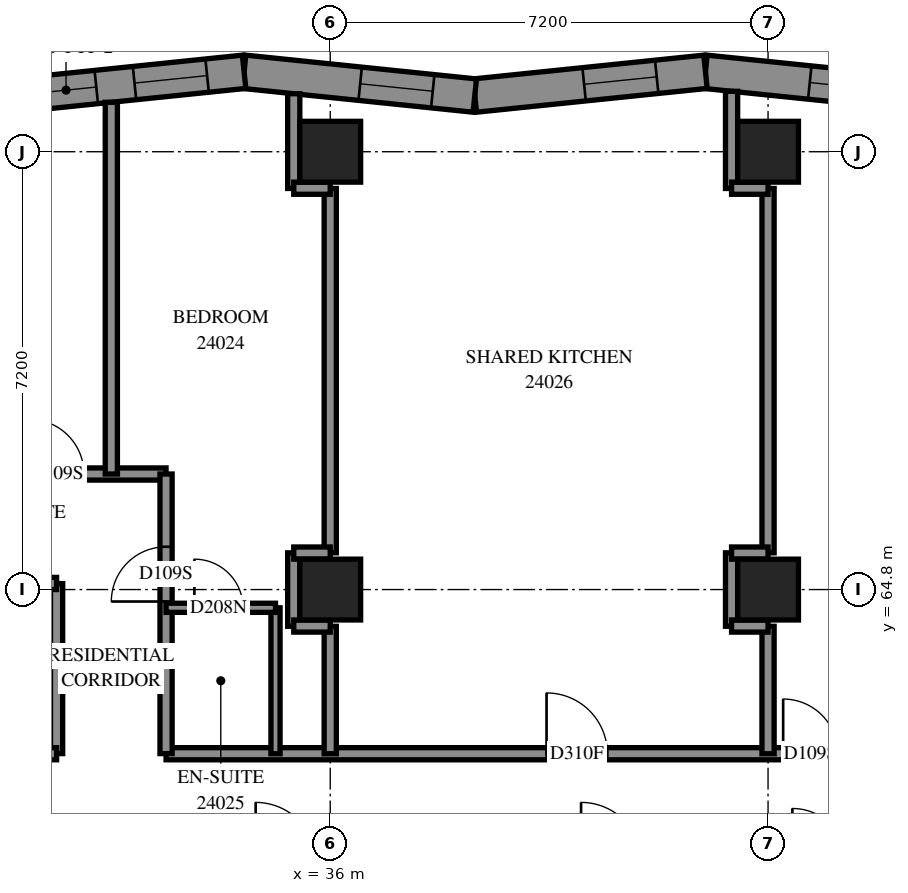
"""IFC4 building model, lengths in metres.
Left out: names, types, materials, properties, quantities, classifications, styles, units other than length and angle.
Written with IfcOpenShell. Run it as: python <this file> out.ifc"""

import sys

from ifc_helpers import new_model, si_unit, direction, frame, frame_2d, origin, origin_2d, place, context, subcontext, project, spatial, polyline, rectangle, outline, extrude, element, fill, save


model = new_model("IFC4")
c1 = context("Model", 3, precision=1e-05, world=origin(), true_north=direction((0.0, 1.0)))
c2 = subcontext(c1, "Body", "Model", "MODEL_VIEW")
j1 = project(units=[si_unit("LENGTHUNIT", "METRE"), si_unit("PLANEANGLEUNIT", "RADIAN")], contexts=[c1])
p1 = place(None, origin())
s1 = spatial("IfcSite", under=j1, at=p1, CompositionType="ELEMENT")
p2 = place(p1, origin())
s2 = spatial("IfcBuilding", under=s1, at=p2, CompositionType="ELEMENT")
p3 = place(p2, frame((0.0, 0.0, 91.4)))
s3 = spatial("IfcBuildingStorey", under=s2, at=p3, CompositionType="ELEMENT", Elevation=91.4)
for number, where, z_axis, x_axis in (
    (1, (36.0, 64.8, 0.0), (0.0, 0.0, 1.0), (1.0, 0.0, 0.0)),
    (2, (36.0, 72.0, 0.0), (0.0, 0.0, 1.0), (1.0, 0.0, 0.0)),
    (3, (43.2, 64.8, 0.0), (0.0, 0.0, 1.0), (1.0, 0.0, 0.0)),
    (4, (43.2, 72.0, 0.0), (0.0, 0.0, 1.0), (1.0, 0.0, 0.0)),
):
    element("IfcColumn", number, at=place(p3, frame(where, z_axis=z_axis, x_axis=x_axis)), inside=s3, PredefinedType="COLUMN", context=c2, shape_type="SweptSolid", body=[
        extrude(rectangle(XDim=1.0, YDim=1.0, at=origin_2d()), origin(), (0.0, 0.0, 1.0), 3.1),
    ])
p4 = place(p3, frame((45.965, 72.924, 0.0), z_axis=(0.0, 0.0, 1.0), x_axis=(-0.9947304076, 0.1025251975, 0.0)))
e5 = element("IfcWall", 5, at=p4, inside=s3, PredefinedType="SOLIDWALL", context=c2, shape_type="SweptSolid", body=[
    extrude(outline(polyline([(0.028, -0.275), (3.842, -0.275), (3.785, 0.275), (-0.028, 0.275), (0.028, -0.275)])), origin(), (0.0, 0.0, 1.0), 3.1),
])
p5 = place(p4, frame((0.89, 0.0, 0.5)))
e6 = element("IfcOpeningElement", 6, at=p5, cuts=e5, PredefinedType="OPENING", context=c2, shape_type="SweptSolid", body=[
    extrude(rectangle(XDim=1.2, YDim=2.45, at=frame_2d((0.6, 1.225))), frame((0.0, 0.285, 0.0), z_axis=(0.0, -1.0, 0.0), x_axis=(1.0, 0.0, 0.0)), (0.0, 0.0, 1.0), 0.57),
])
p6 = place(p3, frame((42.171, 73.314, 0.0), z_axis=(0.0, 0.0, 1.0), x_axis=(-0.9947306832, -0.1025225234, 0.0)))
e7 = element("IfcWall", 7, at=p6, inside=s3, PredefinedType="SOLIDWALL", context=c2, shape_type="SweptSolid", body=[
    extrude(outline(polyline([(-0.028, -0.275), (3.785, -0.275), (3.842, 0.275), (0.028, 0.275), (-0.028, -0.275)])), origin(), (0.0, 0.0, 1.0), 3.1),
])
p7 = place(p6, frame((0.806, 0.0, 0.5)))
e8 = element("IfcOpeningElement", 8, at=p7, cuts=e7, PredefinedType="OPENING", context=c2, shape_type="SweptSolid", body=[
    extrude(rectangle(XDim=1.2, YDim=2.45, at=frame_2d((0.6, 1.225))), frame((0.0, 0.285, 0.0), z_axis=(0.0, -1.0, 0.0), x_axis=(1.0, 0.0, 0.0)), (0.0, 0.0, 1.0), 0.57),
])
p8 = place(p3, frame((38.377, 72.924, 0.0), z_axis=(0.0, 0.0, 1.0), x_axis=(-0.9947306832, 0.1025225234, 0.0)))
e9 = element("IfcWall", 9, at=p8, inside=s3, PredefinedType="SOLIDWALL", context=c2, shape_type="SweptSolid", body=[
    extrude(outline(polyline([(0.028, -0.275), (3.842, -0.275), (3.785, 0.275), (-0.028, 0.275), (0.028, -0.275)])), origin(), (0.0, 0.0, 1.0), 3.1),
])
p9 = place(p8, frame((0.695, 0.0, 0.5)))
e10 = element("IfcOpeningElement", 10, at=p9, cuts=e9, PredefinedType="OPENING", context=c2, shape_type="SweptSolid", body=[
    extrude(rectangle(XDim=1.2, YDim=2.45, at=frame_2d((0.6, 1.225))), frame((0.0, 0.285, 0.0), z_axis=(0.0, -1.0, 0.0), x_axis=(1.0, 0.0, 0.0)), (0.0, 0.0, 1.0), 0.57),
])
p10 = place(p3, frame((34.584, 73.314, 0.0), z_axis=(0.0, 0.0, 1.0), x_axis=(-0.9947304076, -0.1025251975, 0.0)))
e11 = element("IfcWall", 11, at=p10, inside=s3, PredefinedType="SOLIDWALL", context=c2, shape_type="SweptSolid", body=[
    extrude(outline(polyline([(-0.028, -0.275), (3.785, -0.275), (3.842, 0.275), (0.028, 0.275), (-0.028, -0.275)])), origin(), (0.0, 0.0, 1.0), 3.1),
])
p11 = place(p10, frame((0.612, 0.0, 0.5)))
e12 = element("IfcOpeningElement", 12, at=p11, cuts=e11, PredefinedType="OPENING", context=c2, shape_type="SweptSolid", body=[
    extrude(rectangle(XDim=1.2, YDim=2.45, at=frame_2d((0.6, 1.225))), frame((0.0, 0.285, 0.0), z_axis=(0.0, -1.0, 0.0), x_axis=(1.0, 0.0, 0.0)), (0.0, 0.0, 1.0), 0.57),
])
p12 = place(p10, frame((2.444, 0.0, 0.45)))
e13 = element("IfcOpeningElement", 13, at=p12, cuts=e11, PredefinedType="OPENING", context=c2, shape_type="SweptSolid", body=[
    extrude(rectangle(XDim=1.0, YDim=2.5, at=frame_2d((0.5, 1.25))), frame((0.0, 0.285, 0.0), z_axis=(0.0, -1.0, 0.0), x_axis=(1.0, 0.0, 0.0)), (0.0, 0.0, 1.0), 0.57),
])
p13 = place(p3, frame((33.3, 62.1, 0.0), z_axis=(0.0, 0.0, 1.0), x_axis=(1.0, 0.0, 0.0)))
e14 = element("IfcWall", 14, at=p13, inside=s3, PredefinedType="PARTITIONING", context=c2, shape_type="SweptSolid", body=[
    extrude(rectangle(XDim=17.1, YDim=0.2, at=frame_2d((8.55, 0.0))), origin(), (0.0, 0.0, 1.0), 3.1),
])
p14 = place(p13, frame((6.258, 0.0, 0.0)))
e15 = element("IfcOpeningElement", 15, at=p14, cuts=e14, PredefinedType="OPENING", context=c2, shape_type="SweptSolid", body=[
    extrude(rectangle(XDim=1.0, YDim=2.1, at=frame_2d((0.5, 1.05))), frame((0.0, 0.11, 0.0), z_axis=(0.0, -1.0, 0.0), x_axis=(1.0, 0.0, 0.0)), (0.0, 0.0, 1.0), 0.22),
])
p15 = place(p13, frame((10.148, 0.0, 0.0)))
e16 = element("IfcOpeningElement", 16, at=p15, cuts=e14, PredefinedType="OPENING", context=c2, shape_type="SweptSolid", body=[
    extrude(rectangle(XDim=0.9, YDim=2.1, at=frame_2d((0.45, 1.05))), frame((0.0, 0.11, 0.0), z_axis=(0.0, -1.0, 0.0), x_axis=(1.0, 0.0, 0.0)), (0.0, 0.0, 1.0), 0.22),
])
p16 = place(p13, frame((15.729, 0.0, 0.0)))
e17 = element("IfcOpeningElement", 17, at=p16, cuts=e14, PredefinedType="OPENING", context=c2, shape_type="SweptSolid", body=[
    extrude(rectangle(XDim=0.9, YDim=2.1, at=frame_2d((0.45, 1.05))), frame((0.0, 0.11, 0.0), z_axis=(0.0, -1.0, 0.0), x_axis=(1.0, 0.0, 0.0)), (0.0, 0.0, 1.0), 0.22),
])
p17 = place(p3, frame((21.602, 66.7, 0.0), z_axis=(0.0, 0.0, 1.0), x_axis=(1.0, 0.0, 0.0)))
e18 = element("IfcWall", 18, at=p17, inside=s3, PredefinedType="PARTITIONING", context=c2, shape_type="SweptSolid", body=[
    extrude(rectangle(XDim=11.698, YDim=0.2, at=frame_2d((5.849, 0.0))), origin(), (0.0, 0.0, 1.0), 3.1),
])
p18 = place(p17, frame((1.79, 0.0, 0.0)))
e19 = element("IfcOpeningElement", 19, at=p18, cuts=e18, PredefinedType="OPENING", context=c2, shape_type="SweptSolid", body=[
    extrude(rectangle(XDim=1.0, YDim=2.1, at=frame_2d((0.5, 1.05))), frame((0.0, 0.11, 0.0), z_axis=(0.0, -1.0, 0.0), x_axis=(1.0, 0.0, 0.0)), (0.0, 0.0, 1.0), 0.22),
])
p19 = place(p17, frame((3.998, 0.0, 0.0)))
e20 = element("IfcOpeningElement", 20, at=p19, cuts=e18, PredefinedType="OPENING", context=c2, shape_type="SweptSolid", body=[
    extrude(rectangle(XDim=0.9, YDim=2.1, at=frame_2d((0.45, 1.05))), frame((0.0, 0.11, 0.0), z_axis=(0.0, -1.0, 0.0), x_axis=(1.0, 0.0, 0.0)), (0.0, 0.0, 1.0), 0.22),
])
p20 = place(p17, frame((9.448, 0.0, 0.0)))
e21 = element("IfcOpeningElement", 21, at=p20, cuts=e18, PredefinedType="OPENING", context=c2, shape_type="SweptSolid", body=[
    extrude(rectangle(XDim=0.9, YDim=2.1, at=frame_2d((0.45, 1.05))), frame((0.0, 0.11, 0.0), z_axis=(0.0, -1.0, 0.0), x_axis=(1.0, 0.0, 0.0)), (0.0, 0.0, 1.0), 0.22),
])
p21 = place(p3, frame((32.4, 66.7, 0.0), z_axis=(0.0, 0.0, 1.0), x_axis=(0.0, 1.0, 0.0)))
e22 = element("IfcWall", 22, at=p21, inside=s3, PredefinedType="PARTITIONING", context=c2, shape_type="SweptSolid", body=[
    extrude(rectangle(XDim=6.113, YDim=0.2, at=frame_2d((3.057, 0.0))), origin(), (0.0, 0.0, 1.0), 3.1),
])
for number, where, z_axis, x_axis in (
    (23, (36.0, 65.404, 0.0), (0.0, 0.0, 1.0), (0.0, 1.0, 0.0)),
    (24, (43.2, 65.404, 0.0), (0.0, 0.0, 1.0), (0.0, 1.0, 0.0)),
):
    element("IfcWall", number, at=place(p3, frame(where, z_axis=z_axis, x_axis=x_axis)), inside=s3, PredefinedType="PARTITIONING", context=c2, shape_type="SweptSolid", body=[
        extrude(rectangle(XDim=5.992, YDim=0.2, at=frame_2d((2.996, 0.0))), origin(), (0.0, 0.0, 1.0), 3.1),
    ])
p22 = place(p3, frame((33.3, 62.102, 0.0), z_axis=(0.0, 0.0, 1.0), x_axis=(0.0, 1.0, 0.0)))
e25 = element("IfcWall", 25, at=p22, inside=s3, PredefinedType="PARTITIONING", context=c2, shape_type="SweptSolid", body=[
    extrude(rectangle(XDim=4.598, YDim=0.2, at=frame_2d((2.299, 0.0))), origin(), (0.0, 0.0, 1.0), 3.1),
])
p23 = place(p22, frame((2.501, 0.0, 0.0)))
e26 = element("IfcOpeningElement", 26, at=p23, cuts=e25, PredefinedType="OPENING", context=c2, shape_type="SweptSolid", body=[
    extrude(rectangle(XDim=0.9, YDim=2.1, at=frame_2d((0.45, 1.05))), frame((0.0, 0.11, 0.0), z_axis=(0.0, -1.0, 0.0), x_axis=(1.0, 0.0, 0.0)), (0.0, 0.0, 1.0), 0.22),
])
p24 = place(p3, frame((31.5, 62.102, 0.0), z_axis=(0.0, 0.0, 1.0), x_axis=(0.0, 1.0, 0.0)))
e27 = element("IfcWall", 27, at=p24, inside=s3, PredefinedType="PARTITIONING", context=c2, shape_type="SweptSolid", body=[
    extrude(rectangle(XDim=2.796, YDim=0.2, at=frame_2d((1.398, 0.0))), origin(), (0.0, 0.0, 1.0), 3.1),
])
p25 = place(p3, frame((28.802, 62.1, 0.0), z_axis=(0.0, 0.0, 1.0), x_axis=(1.0, 0.0, 0.0)))
e28 = element("IfcWall", 28, at=p25, inside=s3, PredefinedType="PARTITIONING", context=c2, shape_type="SweptSolid", body=[
    extrude(rectangle(XDim=2.698, YDim=0.2, at=frame_2d((1.349, 0.0))), origin(), (0.0, 0.0, 1.0), 3.1),
])
p26 = place(p3, frame((35.1, 62.1, 0.0), z_axis=(0.0, 0.0, 1.0), x_axis=(0.0, 1.0, 0.0)))
e29 = element("IfcWall", 29, at=p26, inside=s3, PredefinedType="PARTITIONING", context=c2, shape_type="SweptSolid", body=[
    extrude(rectangle(XDim=2.4, YDim=0.15, at=frame_2d((1.2, 0.0))), origin(), (0.0, 0.0, 1.0), 3.1),
])
p27 = place(p3, frame((29.3, 64.9, 0.0), z_axis=(0.0, 0.0, 1.0), x_axis=(1.0, 0.0, 0.0)))
e30 = element("IfcWall", 30, at=p27, inside=s3, PredefinedType="PARTITIONING", context=c2, shape_type="SweptSolid", body=[
    extrude(rectangle(XDim=2.2, YDim=0.2, at=frame_2d((1.1, 0.0))), origin(), (0.0, 0.0, 1.0), 3.1),
])
p28 = place(p27, frame((0.31, 0.0, 0.0)))
e31 = element("IfcOpeningElement", 31, at=p28, cuts=e30, PredefinedType="OPENING", context=c2, shape_type="SweptSolid", body=[
    extrude(rectangle(XDim=1.0, YDim=2.1, at=frame_2d((0.5, 1.05))), frame((0.0, 0.11, 0.0), z_axis=(0.0, -1.0, 0.0), x_axis=(1.0, 0.0, 0.0)), (0.0, 0.0, 1.0), 0.22),
])
for number, where, z_axis, x_axis in (
    (32, (36.0, 62.1, 0.0), (0.0, 0.0, 1.0), (0.0, 1.0, 0.0)),
    (33, (43.2, 62.1, 0.0), (0.0, 0.0, 1.0), (0.0, 1.0, 0.0)),
):
    element("IfcWall", number, at=place(p3, frame(where, z_axis=z_axis, x_axis=x_axis)), inside=s3, PredefinedType="PARTITIONING", context=c2, shape_type="SweptSolid", body=[
        extrude(rectangle(XDim=2.096, YDim=0.2, at=frame_2d((1.048, 0.0))), origin(), (0.0, 0.0, 1.0), 3.1),
    ])
p29 = place(p3, frame((33.3, 64.5, 0.0), z_axis=(0.0, 0.0, 1.0), x_axis=(1.0, 0.0, 0.0)))
e34 = element("IfcWall", 34, at=p29, inside=s3, PredefinedType="PARTITIONING", context=c2, shape_type="SweptSolid", body=[
    extrude(rectangle(XDim=1.8, YDim=0.15, at=frame_2d((0.9, 0.0))), origin(), (0.0, 0.0, 1.0), 3.1),
])
p30 = place(p29, frame((0.466, 0.0, 0.0)))
e35 = element("IfcOpeningElement", 35, at=p30, cuts=e34, PredefinedType="OPENING", context=c2, shape_type="SweptSolid", body=[
    extrude(rectangle(XDim=0.8, YDim=2.1, at=frame_2d((0.4, 1.05))), frame((0.0, 0.085, 0.0), z_axis=(0.0, -1.0, 0.0), x_axis=(1.0, 0.0, 0.0)), (0.0, 0.0, 1.0), 0.17),
])
p31 = place(p3, frame((42.6, 71.396, 0.0), z_axis=(0.0, 0.0, 1.0), x_axis=(0.0, 1.0, 0.0)))
e36 = element("IfcWall", 36, at=p31, inside=s3, PredefinedType="PARTITIONING", context=c2, shape_type="SweptSolid", body=[
    extrude(rectangle(XDim=1.598, YDim=0.2, at=frame_2d((0.799, 0.0))), origin(), (0.0, 0.0, 1.0), 3.1),
])
p32 = place(p3, frame((35.4, 71.396, 0.0), z_axis=(0.0, 0.0, 1.0), x_axis=(0.0, 1.0, 0.0)))
e37 = element("IfcWall", 37, at=p32, inside=s3, PredefinedType="PARTITIONING", context=c2, shape_type="SweptSolid", body=[
    extrude(rectangle(XDim=1.558, YDim=0.2, at=frame_2d((0.779, 0.0))), origin(), (0.0, 0.0, 1.0), 3.1),
])
for number, where, z_axis, x_axis in (
    (38, (35.4, 64.196, 0.0), (0.0, 0.0, 1.0), (0.0, 1.0, 0.0)),
    (39, (42.6, 64.196, 0.0), (0.0, 0.0, 1.0), (0.0, 1.0, 0.0)),
):
    element("IfcWall", number, at=place(p3, frame(where, z_axis=z_axis, x_axis=x_axis)), inside=s3, PredefinedType="PARTITIONING", context=c2, shape_type="SweptSolid", body=[
        extrude(rectangle(XDim=1.208, YDim=0.2, at=frame_2d((0.604, 0.0))), origin(), (0.0, 0.0, 1.0), 3.1),
    ])
for number, where, z_axis, x_axis in (
    (40, (35.4, 71.4, 0.0), (0.0, 0.0, 1.0), (1.0, 0.0, 0.0)),
    (41, (42.6, 71.4, 0.0), (0.0, 0.0, 1.0), (1.0, 0.0, 0.0)),
    (42, (35.4, 65.4, 0.0), (0.0, 0.0, 1.0), (1.0, 0.0, 0.0)),
    (43, (42.6, 65.4, 0.0), (0.0, 0.0, 1.0), (1.0, 0.0, 0.0)),
    (44, (35.4, 64.2, 0.0), (0.0, 0.0, 1.0), (1.0, 0.0, 0.0)),
    (45, (42.6, 64.2, 0.0), (0.0, 0.0, 1.0), (1.0, 0.0, 0.0)),
):
    element("IfcWall", number, at=place(p3, frame(where, z_axis=z_axis, x_axis=x_axis)), inside=s3, PredefinedType="PARTITIONING", context=c2, shape_type="SweptSolid", body=[
        extrude(rectangle(XDim=0.6, YDim=0.2, at=frame_2d((0.3, 0.0))), origin(), (0.0, 0.0, 1.0), 3.1),
    ])
p33 = place(p5, origin())
e46 = element("IfcWindow", 46, at=p33, inside=s3, PartitioningType="SINGLE_PANEL", PredefinedType="WINDOW", context=c2, shape_type="SweptSolid", body=[
    extrude(rectangle(XDim=1.2, YDim=2.45, at=frame_2d((0.6, 1.225))), frame((0.0, 0.155, 0.0), z_axis=(0.0, -1.0, 0.0), x_axis=(1.0, 0.0, 0.0)), (0.0, 0.0, 1.0), 0.06),
])
fill(e6, e46)
p34 = place(p7, origin())
e47 = element("IfcWindow", 47, at=p34, inside=s3, PartitioningType="SINGLE_PANEL", PredefinedType="WINDOW", context=c2, shape_type="SweptSolid", body=[
    extrude(rectangle(XDim=1.2, YDim=2.45, at=frame_2d((0.6, 1.225))), frame((0.0, 0.155, 0.0), z_axis=(0.0, -1.0, 0.0), x_axis=(1.0, 0.0, 0.0)), (0.0, 0.0, 1.0), 0.06),
])
fill(e8, e47)
p35 = place(p9, origin())
e48 = element("IfcWindow", 48, at=p35, inside=s3, PartitioningType="SINGLE_PANEL", PredefinedType="WINDOW", context=c2, shape_type="SweptSolid", body=[
    extrude(rectangle(XDim=1.2, YDim=2.45, at=frame_2d((0.6, 1.225))), frame((0.0, 0.155, 0.0), z_axis=(0.0, -1.0, 0.0), x_axis=(1.0, 0.0, 0.0)), (0.0, 0.0, 1.0), 0.06),
])
fill(e10, e48)
p36 = place(p11, origin())
e49 = element("IfcWindow", 49, at=p36, inside=s3, PartitioningType="SINGLE_PANEL", PredefinedType="WINDOW", context=c2, shape_type="SweptSolid", body=[
    extrude(rectangle(XDim=1.2, YDim=2.45, at=frame_2d((0.6, 1.225))), frame((0.0, 0.155, 0.0), z_axis=(0.0, -1.0, 0.0), x_axis=(1.0, 0.0, 0.0)), (0.0, 0.0, 1.0), 0.06),
])
fill(e12, e49)
p37 = place(p20, origin())
e50 = element("IfcDoor", 50, at=p37, inside=s3, OperationType="SINGLE_SWING_RIGHT", PredefinedType="DOOR", context=c2, shape_type="SweptSolid", body=[
    extrude(rectangle(XDim=0.9, YDim=2.1, at=frame_2d((0.45, 1.05))), frame((0.0, 0.025, 0.0), z_axis=(0.0, -1.0, 0.0), x_axis=(1.0, 0.0, 0.0)), (0.0, 0.0, 1.0), 0.05),
])
fill(e21, e50)
p38 = place(p23, origin())
e51 = element("IfcDoor", 51, at=p38, inside=s3, OperationType="SINGLE_SWING_LEFT", PredefinedType="DOOR", context=c2, shape_type="SweptSolid", body=[
    extrude(rectangle(XDim=0.9, YDim=2.1, at=frame_2d((0.45, 1.05))), frame((0.0, 0.025, 0.0), z_axis=(0.0, -1.0, 0.0), x_axis=(1.0, 0.0, 0.0)), (0.0, 0.0, 1.0), 0.05),
])
fill(e26, e51)
p39 = place(p30, origin())
e52 = element("IfcDoor", 52, at=p39, inside=s3, OperationType="SINGLE_SWING_RIGHT", PredefinedType="DOOR", context=c2, shape_type="SweptSolid", body=[
    extrude(rectangle(XDim=0.8, YDim=2.1, at=frame_2d((0.4, 1.05))), frame((0.0, 0.025, 0.0), z_axis=(0.0, -1.0, 0.0), x_axis=(1.0, 0.0, 0.0)), (0.0, 0.0, 1.0), 0.05),
])
fill(e35, e52)
p40 = place(p14, origin())
e53 = element("IfcDoor", 53, at=p40, inside=s3, OperationType="SINGLE_SWING_RIGHT", PredefinedType="DOOR", context=c2, shape_type="SweptSolid", body=[
    extrude(rectangle(XDim=1.0, YDim=2.1, at=frame_2d((0.5, 1.05))), frame((0.0, 0.025, 0.0), z_axis=(0.0, -1.0, 0.0), x_axis=(1.0, 0.0, 0.0)), (0.0, 0.0, 1.0), 0.05),
])
fill(e15, e53)
p41 = place(p15, origin())
e54 = element("IfcDoor", 54, at=p41, inside=s3, OperationType="SINGLE_SWING_RIGHT", PredefinedType="DOOR", context=c2, shape_type="SweptSolid", body=[
    extrude(rectangle(XDim=0.9, YDim=2.1, at=frame_2d((0.45, 1.05))), frame((0.0, 0.025, 0.0), z_axis=(0.0, -1.0, 0.0), x_axis=(1.0, 0.0, 0.0)), (0.0, 0.0, 1.0), 0.05),
])
fill(e16, e54)
p42 = place(p12, origin())
e55 = element("IfcWindow", 55, at=p42, inside=s3, PartitioningType="SINGLE_PANEL", PredefinedType="WINDOW", context=c2, shape_type="SweptSolid", body=[
    extrude(rectangle(XDim=1.0, YDim=2.5, at=frame_2d((0.5, 1.25))), frame((0.0, 0.155, 0.0), z_axis=(0.0, -1.0, 0.0), x_axis=(1.0, 0.0, 0.0)), (0.0, 0.0, 1.0), 0.06),
])
fill(e13, e55)
save(model, sys.argv[1])
